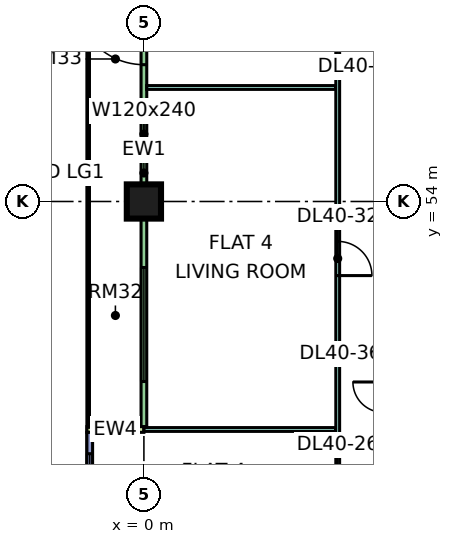
"""IFC4 building model, lengths in metres.
Left out: names, types, materials, properties, quantities, classifications, styles, units other than length and angle.
Written with IfcOpenShell. Run it as: python <this file> out.ifc"""

import sys

from ifc_helpers import new_model, si_unit, direction, frame, frame_2d, origin, origin_2d, place, context, subcontext, project, spatial, rectangle, extrude, element, fill, save


model = new_model("IFC4")
c1 = context("Model", 3, precision=1e-05, world=origin(), true_north=direction((0.0, 1.0)))
c2 = subcontext(c1, "Body", "Model", "MODEL_VIEW")
j1 = project(units=[si_unit("LENGTHUNIT", "METRE"), si_unit("PLANEANGLEUNIT", "RADIAN")], contexts=[c1])
p1 = place(None, origin())
s1 = spatial("IfcSite", under=j1, at=p1, CompositionType="ELEMENT")
p2 = place(p1, origin())
s2 = spatial("IfcBuilding", under=s1, at=p2, CompositionType="ELEMENT")
p3 = place(p2, frame((0.0, 0.0, 176.15)))
s3 = spatial("IfcBuildingStorey", under=s2, at=p3, CompositionType="ELEMENT", Elevation=176.15)
p4 = place(p3, frame((0.0, 54.0, 0.0), z_axis=(0.0, 0.0, 1.0), x_axis=(1.0, 0.0, 0.0)))
e1 = element("IfcColumn", 1, at=p4, inside=s3, PredefinedType="COLUMN", context=c2, shape_type="SweptSolid", body=[
    extrude(rectangle(XDim=0.9, YDim=0.9, at=origin_2d()), origin(), (0.0, 0.0, 1.0), 3.75),
])
p5 = place(p3, frame((0.0, 61.425, 0.0), z_axis=(0.0, 0.0, 1.0), x_axis=(0.0, -1.0, 0.0)))
e2 = element("IfcWall", 2, at=p5, inside=s3, PredefinedType="SOLIDWALL", context=c2, shape_type="SweptSolid", body=[
    extrude(rectangle(XDim=13.35, YDim=0.15, at=frame_2d((6.675, 0.0))), origin(), (0.0, 0.0, 1.0), 3.35),
])
p6 = place(p5, frame((0.262, 0.0, 0.45)))
e3 = element("IfcOpeningElement", 3, at=p6, cuts=e2, PredefinedType="OPENING", context=c2, shape_type="SweptSolid", body=[
    extrude(rectangle(XDim=0.9, YDim=2.4, at=frame_2d((0.45, 1.2))), frame((0.0, 0.085, 0.0), z_axis=(0.0, -1.0, 0.0), x_axis=(1.0, 0.0, 0.0)), (0.0, 0.0, 1.0), 0.17),
])
p7 = place(p5, frame((2.025, 0.0, 0.0)))
e4 = element("IfcOpeningElement", 4, at=p7, cuts=e2, PredefinedType="OPENING", context=c2, shape_type="SweptSolid", body=[
    extrude(rectangle(XDim=1.8, YDim=2.4, at=frame_2d((0.9, 1.2))), frame((0.0, 0.085, 0.0), z_axis=(0.0, -1.0, 0.0), x_axis=(1.0, 0.0, 0.0)), (0.0, 0.0, 1.0), 0.17),
])
p8 = place(p5, frame((5.05, 0.0, 0.45)))
e5 = element("IfcOpeningElement", 5, at=p8, cuts=e2, PredefinedType="OPENING", context=c2, shape_type="SweptSolid", body=[
    extrude(rectangle(XDim=1.2, YDim=2.4, at=frame_2d((0.6, 1.2))), frame((0.0, 0.085, 0.0), z_axis=(0.0, -1.0, 0.0), x_axis=(1.0, 0.0, 0.0)), (0.0, 0.0, 1.0), 0.17),
])
p9 = place(p5, frame((9.163, 0.0, 0.45)))
e6 = element("IfcOpeningElement", 6, at=p9, cuts=e2, PredefinedType="OPENING", context=c2, shape_type="SweptSolid", body=[
    extrude(rectangle(XDim=3.0, YDim=2.4, at=frame_2d((1.5, 1.2))), frame((0.0, 0.085, 0.0), z_axis=(0.0, -1.0, 0.0), x_axis=(1.0, 0.0, 0.0)), (0.0, 0.0, 1.0), 0.17),
])
p10 = place(p3, frame((-1.5, 48.0, 0.0), z_axis=(0.0, 0.0, 1.0), x_axis=(1.0, 0.0, 0.0)))
e7 = element("IfcWall", 7, at=p10, inside=s3, PredefinedType="SOLIDWALL", context=c2, shape_type="SweptSolid", body=[
    extrude(rectangle(XDim=1.5, YDim=0.15, at=frame_2d((0.75, 0.0))), origin(), (0.0, 0.0, 1.0), 3.35),
])
p11 = place(p3, frame((-1.425, 47.925, 0.0), z_axis=(0.0, 0.0, 1.0), x_axis=(0.0, -1.0, 0.0)))
e8 = element("IfcWall", 8, at=p11, inside=s3, PredefinedType="SOLIDWALL", context=c2, shape_type="SweptSolid", body=[
    extrude(rectangle(XDim=11.85, YDim=0.15, at=frame_2d((5.925, 0.0))), origin(), (0.0, 0.0, 1.0), 3.35),
])
p12 = place(p11, frame((0.562, 0.0, 0.45)))
e9 = element("IfcOpeningElement", 9, at=p12, cuts=e8, PredefinedType="OPENING", context=c2, shape_type="SweptSolid", body=[
    extrude(rectangle(XDim=1.8, YDim=2.4, at=frame_2d((0.9, 1.2))), frame((0.0, 0.085, 0.0), z_axis=(0.0, -1.0, 0.0), x_axis=(1.0, 0.0, 0.0)), (0.0, 0.0, 1.0), 0.17),
])
p13 = place(p11, frame((3.525, 0.0, 0.45)))
e10 = element("IfcOpeningElement", 10, at=p13, cuts=e8, PredefinedType="OPENING", context=c2, shape_type="SweptSolid", body=[
    extrude(rectangle(XDim=1.8, YDim=2.4, at=frame_2d((0.9, 1.2))), frame((0.0, 0.085, 0.0), z_axis=(0.0, -1.0, 0.0), x_axis=(1.0, 0.0, 0.0)), (0.0, 0.0, 1.0), 0.17),
])
p14 = place(p11, frame((6.525, 0.0, 0.45)))
e11 = element("IfcOpeningElement", 11, at=p14, cuts=e8, PredefinedType="OPENING", context=c2, shape_type="SweptSolid", body=[
    extrude(rectangle(XDim=1.8, YDim=2.4, at=frame_2d((0.9, 1.2))), frame((0.0, 0.085, 0.0), z_axis=(0.0, -1.0, 0.0), x_axis=(1.0, 0.0, 0.0)), (0.0, 0.0, 1.0), 0.17),
])
p15 = place(p11, frame((9.488, 0.0, 0.45)))
e12 = element("IfcOpeningElement", 12, at=p15, cuts=e8, PredefinedType="OPENING", context=c2, shape_type="SweptSolid", body=[
    extrude(rectangle(XDim=1.8, YDim=2.4, at=frame_2d((0.9, 1.2))), frame((0.0, 0.085, 0.0), z_axis=(0.0, -1.0, 0.0), x_axis=(1.0, 0.0, 0.0)), (0.0, 0.0, 1.0), 0.17),
])
p16 = place(p3, frame((0.0, 48.0, 0.0), z_axis=(0.0, 0.0, 1.0), x_axis=(1.0, 0.0, 0.0)))
e13 = element("IfcWall", 13, at=p16, inside=s3, PredefinedType="PARTITIONING", context=c2, shape_type="SweptSolid", body=[
    extrude(rectangle(XDim=5.05, YDim=0.1, at=frame_2d((2.525, 0.0))), origin(), (0.0, 0.0, 1.0), 3.35),
])
p17 = place(p3, frame((0.074, 57.0, 0.0), z_axis=(0.0, 0.0, 1.0), x_axis=(1.0, 0.0, 0.0)))
e14 = element("IfcWall", 14, at=p17, inside=s3, PredefinedType="PARTITIONING", context=c2, shape_type="SweptSolid", body=[
    extrude(rectangle(XDim=4.976, YDim=0.1, at=frame_2d((2.488, 0.0))), origin(), (0.0, 0.0, 1.0), 3.35),
])
p18 = place(p3, frame((5.1, 36.1, 0.0), z_axis=(0.0, 0.0, 1.0), x_axis=(0.0, 1.0, 0.0)))
e15 = element("IfcWall", 15, at=p18, inside=s3, PredefinedType="PARTITIONING", context=c2, shape_type="SweptSolid", body=[
    extrude(rectangle(XDim=26.826, YDim=0.1, at=frame_2d((13.413, 0.0))), origin(), (0.0, 0.0, 1.0), 3.35),
])
p19 = place(p18, frame((0.95, 0.0, 0.0)))
e16 = element("IfcOpeningElement", 16, at=p19, cuts=e15, PredefinedType="OPENING", context=c2, shape_type="SweptSolid", body=[
    extrude(rectangle(XDim=0.9, YDim=2.1, at=frame_2d((0.45, 1.05))), frame((0.0, 0.06, 0.0), z_axis=(0.0, -1.0, 0.0), x_axis=(1.0, 0.0, 0.0)), (0.0, 0.0, 1.0), 0.12),
])
p20 = place(p18, frame((3.95, 0.0, 0.0)))
e17 = element("IfcOpeningElement", 17, at=p20, cuts=e15, PredefinedType="OPENING", context=c2, shape_type="SweptSolid", body=[
    extrude(rectangle(XDim=0.9, YDim=2.1, at=frame_2d((0.45, 1.05))), frame((0.0, 0.06, 0.0), z_axis=(0.0, -1.0, 0.0), x_axis=(1.0, 0.0, 0.0)), (0.0, 0.0, 1.0), 0.12),
])
p21 = place(p18, frame((9.95, 0.0, 0.0)))
e18 = element("IfcOpeningElement", 18, at=p21, cuts=e15, PredefinedType="OPENING", context=c2, shape_type="SweptSolid", body=[
    extrude(rectangle(XDim=0.9, YDim=2.1, at=frame_2d((0.45, 1.05))), frame((0.0, 0.06, 0.0), z_axis=(0.0, -1.0, 0.0), x_axis=(1.0, 0.0, 0.0)), (0.0, 0.0, 1.0), 0.12),
])
p22 = place(p18, frame((21.95, 0.0, 0.0)))
e19 = element("IfcOpeningElement", 19, at=p22, cuts=e15, PredefinedType="OPENING", context=c2, shape_type="SweptSolid", body=[
    extrude(rectangle(XDim=0.9, YDim=2.1, at=frame_2d((0.45, 1.05))), frame((0.0, 0.06, 0.0), z_axis=(0.0, -1.0, 0.0), x_axis=(1.0, 0.0, 0.0)), (0.0, 0.0, 1.0), 0.12),
])
p23 = place(p18, frame((24.95, 0.0, 0.0)))
e20 = element("IfcOpeningElement", 20, at=p23, cuts=e15, PredefinedType="OPENING", context=c2, shape_type="SweptSolid", body=[
    extrude(rectangle(XDim=0.9, YDim=2.1, at=frame_2d((0.45, 1.05))), frame((0.0, 0.06, 0.0), z_axis=(0.0, -1.0, 0.0), x_axis=(1.0, 0.0, 0.0)), (0.0, 0.0, 1.0), 0.12),
])
p24 = place(p18, frame((15.95, 0.0, 0.0)))
e21 = element("IfcOpeningElement", 21, at=p24, cuts=e15, PredefinedType="OPENING", context=c2, shape_type="SweptSolid", body=[
    extrude(rectangle(XDim=0.9, YDim=2.1, at=frame_2d((0.45, 1.05))), frame((0.0, 0.06, 0.0), z_axis=(0.0, -1.0, 0.0), x_axis=(1.0, 0.0, 0.0)), (0.0, 0.0, 1.0), 0.12),
])
p25 = place(p18, frame((6.95, 0.0, 0.0)))
e22 = element("IfcOpeningElement", 22, at=p25, cuts=e15, PredefinedType="OPENING", context=c2, shape_type="SweptSolid", body=[
    extrude(rectangle(XDim=0.9, YDim=2.1, at=frame_2d((0.45, 1.05))), frame((0.0, 0.06, 0.0), z_axis=(0.0, -1.0, 0.0), x_axis=(1.0, 0.0, 0.0)), (0.0, 0.0, 1.0), 0.12),
])
p26 = place(p7, frame((1.8, 0.0, 0.0), z_axis=(0.0, 0.0, 1.0), x_axis=(-1.0, 0.0, 0.0)))
e23 = element("IfcDoor", 23, at=p26, inside=s3, OperationType="DOUBLE_DOOR_SINGLE_SWING", PredefinedType="DOOR", context=c2, shape_type="SweptSolid", body=[
    extrude(rectangle(XDim=1.8, YDim=2.4, at=frame_2d((0.9, 1.2))), frame((0.0, 0.025, 0.0), z_axis=(0.0, -1.0, 0.0), x_axis=(1.0, 0.0, 0.0)), (0.0, 0.0, 1.0), 0.05),
])
fill(e4, e23)
p27 = place(p8, origin())
e24 = element("IfcWindow", 24, at=p27, inside=s3, PartitioningType="SINGLE_PANEL", PredefinedType="WINDOW", context=c2, shape_type="SweptSolid", body=[
    extrude(rectangle(XDim=1.2, YDim=2.4, at=frame_2d((0.6, 1.2))), frame((0.0, 0.03, 0.0), z_axis=(0.0, -1.0, 0.0), x_axis=(1.0, 0.0, 0.0)), (0.0, 0.0, 1.0), 0.06),
])
fill(e5, e24)
p28 = place(p9, origin())
e25 = element("IfcWindow", 25, at=p28, inside=s3, PartitioningType="SINGLE_PANEL", PredefinedType="WINDOW", context=c2, shape_type="SweptSolid", body=[
    extrude(rectangle(XDim=3.0, YDim=2.4, at=frame_2d((1.5, 1.2))), frame((0.0, 0.03, 0.0), z_axis=(0.0, -1.0, 0.0), x_axis=(1.0, 0.0, 0.0)), (0.0, 0.0, 1.0), 0.06),
])
fill(e6, e25)
p29 = place(p12, origin())
e26 = element("IfcWindow", 26, at=p29, inside=s3, PartitioningType="SINGLE_PANEL", PredefinedType="WINDOW", context=c2, shape_type="SweptSolid", body=[
    extrude(rectangle(XDim=1.8, YDim=2.4, at=frame_2d((0.9, 1.2))), frame((0.0, 0.03, 0.0), z_axis=(0.0, -1.0, 0.0), x_axis=(1.0, 0.0, 0.0)), (0.0, 0.0, 1.0), 0.06),
])
fill(e9, e26)
p30 = place(p24, frame((0.9, 0.0, 0.0), z_axis=(0.0, 0.0, 1.0), x_axis=(-1.0, 0.0, 0.0)))
e27 = element("IfcDoor", 27, at=p30, inside=s3, OperationType="SINGLE_SWING_LEFT", PredefinedType="DOOR", context=c2, shape_type="SweptSolid", body=[
    extrude(rectangle(XDim=0.9, YDim=2.1, at=frame_2d((0.45, 1.05))), frame((0.0, 0.025, 0.0), z_axis=(0.0, -1.0, 0.0), x_axis=(1.0, 0.0, 0.0)), (0.0, 0.0, 1.0), 0.05),
])
fill(e21, e27)
save(model, sys.argv[1])
